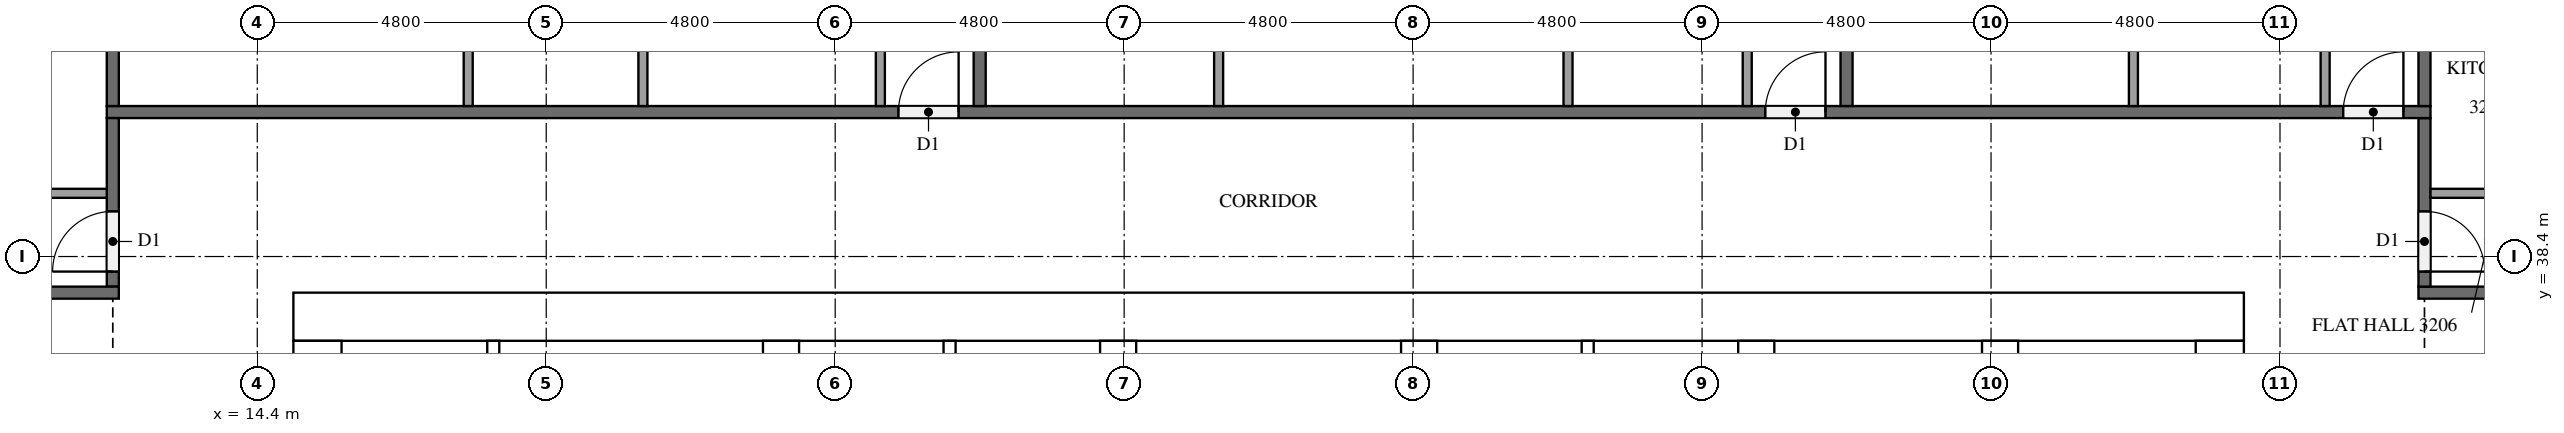
"""IFC4 building model, lengths in metres.
Left out: names, types, materials, properties, quantities, classifications, styles, units other than length and angle.
Written with IfcOpenShell. Run it as: python <this file> out.ifc"""

import sys

from ifc_helpers import new_model, si_unit, direction, frame, frame_2d, origin, place, context, subcontext, project, spatial, rectangle, extrude, element, fill, save


model = new_model("IFC4")
c1 = context("Model", 3, precision=1e-05, world=origin(), true_north=direction((0.0, 1.0)))
c2 = subcontext(c1, "Body", "Model", "MODEL_VIEW")
j1 = project(units=[si_unit("LENGTHUNIT", "METRE"), si_unit("PLANEANGLEUNIT", "RADIAN")], contexts=[c1])
p1 = place(None, origin())
s1 = spatial("IfcSite", under=j1, at=p1, CompositionType="ELEMENT")
p2 = place(p1, origin())
s2 = spatial("IfcBuilding", under=s1, at=p2, CompositionType="ELEMENT")
p3 = place(p2, frame((0.0, 0.0, 126.1)))
s3 = spatial("IfcBuildingStorey", under=s2, at=p3, CompositionType="ELEMENT", Elevation=126.1)
p4 = place(p3, frame((15.0, 37.4, 0.0), z_axis=(0.0, 0.0, 1.0), x_axis=(1.0, 0.0, 0.0)))
e1 = element("IfcWall", 1, at=p4, inside=s3, PredefinedType="SHEAR", context=c2, shape_type="SweptSolid", body=[
    extrude(rectangle(XDim=32.4, YDim=0.8, at=frame_2d((16.2, 0.0))), origin(), (0.0, 0.0, 1.0), 3.2),
])
p5 = place(p4, frame((15.3, 0.0, 0.0)))
e2 = element("IfcOpeningElement", 2, at=p5, cuts=e1, PredefinedType="OPENING", context=c2, shape_type="SweptSolid", body=[
    extrude(rectangle(XDim=1.8, YDim=2.1, at=frame_2d((0.9, 1.05))), frame((0.0, 0.41, 0.0), z_axis=(0.0, -1.0, 0.0), x_axis=(1.0, 0.0, 0.0)), (0.0, 0.0, 1.0), 0.82),
])
p6 = place(p4, frame((1.51, 0.0, 0.0)))
e3 = element("IfcOpeningElement", 3, at=p6, cuts=e1, PredefinedType="OPENING", context=c2, shape_type="SweptSolid", body=[
    extrude(rectangle(XDim=1.0, YDim=2.1, at=frame_2d((0.5, 1.05))), frame((0.0, 0.41, 0.0), z_axis=(0.0, -1.0, 0.0), x_axis=(1.0, 0.0, 0.0)), (0.0, 0.0, 1.0), 0.82),
])
p7 = place(p4, frame((5.11, 0.0, 0.0)))
e4 = element("IfcOpeningElement", 4, at=p7, cuts=e1, PredefinedType="OPENING", context=c2, shape_type="SweptSolid", body=[
    extrude(rectangle(XDim=1.0, YDim=2.1, at=frame_2d((0.5, 1.05))), frame((0.0, 0.41, 0.0), z_axis=(0.0, -1.0, 0.0), x_axis=(1.0, 0.0, 0.0)), (0.0, 0.0, 1.0), 0.82),
])
p8 = place(p3, frame((15.4, 15.8, 0.0), z_axis=(0.0, 0.0, 1.0), x_axis=(0.0, 1.0, 0.0)))
e5 = element("IfcWall", 5, at=p8, inside=s3, PredefinedType="SHEAR", context=c2, shape_type="SweptSolid", body=[
    extrude(rectangle(XDim=21.2, YDim=0.8, at=frame_2d((10.6, 0.0))), origin(), (0.0, 0.0, 1.0), 3.2),
])
p9 = place(p8, frame((4.96, 0.0, 0.0)))
e6 = element("IfcOpeningElement", 6, at=p9, cuts=e5, PredefinedType="OPENING", context=c2, shape_type="SweptSolid", body=[
    extrude(rectangle(XDim=1.2, YDim=2.1, at=frame_2d((0.6, 1.05))), frame((0.0, 0.41, 0.0), z_axis=(0.0, -1.0, 0.0), x_axis=(1.0, 0.0, 0.0)), (0.0, 0.0, 1.0), 0.82),
])
p10 = place(p3, frame((47.0, 15.8, 0.0), z_axis=(0.0, 0.0, 1.0), x_axis=(0.0, 1.0, 0.0)))
e7 = element("IfcWall", 7, at=p10, inside=s3, PredefinedType="SHEAR", context=c2, shape_type="SweptSolid", body=[
    extrude(rectangle(XDim=21.2, YDim=0.8, at=frame_2d((10.6, 0.0))), origin(), (0.0, 0.0, 1.0), 3.2),
])
p11 = place(p10, frame((10.3, 0.0, 0.0)))
e8 = element("IfcOpeningElement", 8, at=p11, cuts=e7, PredefinedType="OPENING", context=c2, shape_type="SweptSolid", body=[
    extrude(rectangle(XDim=1.2, YDim=2.1, at=frame_2d((0.6, 1.05))), frame((0.0, 0.41, 0.0), z_axis=(0.0, -1.0, 0.0), x_axis=(1.0, 0.0, 0.0)), (0.0, 0.0, 1.0), 0.82),
])
p12 = place(p3, frame((23.1, 15.8, 0.0), z_axis=(0.0, 0.0, 1.0), x_axis=(0.0, 1.0, 0.0)))
e9 = element("IfcWall", 9, at=p12, inside=s3, PredefinedType="SHEAR", context=c2, shape_type="SweptSolid", body=[
    extrude(rectangle(XDim=21.2, YDim=0.6, at=frame_2d((10.6, 0.0))), origin(), (0.0, 0.0, 1.0), 3.2),
])
p13 = place(p3, frame((39.3, 27.75, 0.0), z_axis=(0.0, 0.0, 1.0), x_axis=(0.0, 1.0, 0.0)))
e10 = element("IfcWall", 10, at=p13, inside=s3, PredefinedType="SHEAR", context=c2, shape_type="SweptSolid", body=[
    extrude(rectangle(XDim=9.25, YDim=0.6, at=frame_2d((4.625, 0.0))), origin(), (0.0, 0.0, 1.0), 3.2),
])
p14 = place(p3, frame((43.35, 27.75, 0.0), z_axis=(0.0, 0.0, 1.0), x_axis=(0.0, 1.0, 0.0)))
e11 = element("IfcWall", 11, at=p14, inside=s3, PredefinedType="SHEAR", context=c2, shape_type="SweptSolid", body=[
    extrude(rectangle(XDim=9.25, YDim=0.6, at=frame_2d((4.625, 0.0))), origin(), (0.0, 0.0, 1.0), 3.2),
])
p15 = place(p14, frame((7.65, 0.0, 0.0)))
e12 = element("IfcOpeningElement", 12, at=p15, cuts=e11, PredefinedType="OPENING", context=c2, shape_type="SweptSolid", body=[
    extrude(rectangle(XDim=1.2, YDim=2.1, at=frame_2d((0.6, 1.05))), frame((0.0, 0.31, 0.0), z_axis=(0.0, -1.0, 0.0), x_axis=(1.0, 0.0, 0.0)), (0.0, 0.0, 1.0), 0.62),
])
for number, where, z_axis, x_axis in (
    (13, (28.7, 33.85, 0.0), (0.0, 0.0, 1.0), (0.0, 1.0, 0.0)),
    (14, (33.7, 33.85, 0.0), (0.0, 0.0, 1.0), (0.0, 1.0, 0.0)),
):
    element("IfcWall", number, at=place(p3, frame(where, z_axis=z_axis, x_axis=x_axis)), inside=s3, PredefinedType="SHEAR", context=c2, shape_type="SweptSolid", body=[
        extrude(rectangle(XDim=3.15, YDim=0.6, at=frame_2d((1.575, 0.0))), origin(), (0.0, 0.0, 1.0), 3.2),
    ])
for number, where, z_axis, x_axis in (
    (15, (25.9, 33.85, 0.0), (0.0, 0.0, 1.0), (0.0, 1.0, 0.0)),
    (16, (36.5, 33.85, 0.0), (0.0, 0.0, 1.0), (0.0, 1.0, 0.0)),
):
    element("IfcWall", number, at=place(p3, frame(where, z_axis=z_axis, x_axis=x_axis)), inside=s3, PredefinedType="SOLIDWALL", context=c2, shape_type="SweptSolid", body=[
        extrude(rectangle(XDim=3.15, YDim=0.2, at=frame_2d((1.575, 0.0))), origin(), (0.0, 0.0, 1.0), 3.2),
    ])
p16 = place(p3, frame((18.32, 31.55, 0.0), z_axis=(0.0, 0.0, 1.0), x_axis=(0.0, 1.0, 0.0)))
e17 = element("IfcWall", 17, at=p16, inside=s3, PredefinedType="PARTITIONING", context=c2, shape_type="SweptSolid", body=[
    extrude(rectangle(XDim=5.45, YDim=0.2, at=frame_2d((2.725, 0.0))), origin(), (0.0, 0.0, 1.0), 3.2),
])
p17 = place(p3, frame((52.5, 37.8, 0.0), z_axis=(0.0, 0.0, 1.0), x_axis=(-1.0, 0.0, 0.0)))
e18 = element("IfcWall", 18, at=p17, inside=s3, PredefinedType="PARTITIONING", context=c2, shape_type="SweptSolid", body=[
    extrude(rectangle(XDim=2.2, YDim=0.2, at=frame_2d((1.1, 0.0))), origin(), (0.0, 0.0, 1.0), 3.2),
])
p18 = place(p3, frame((50.4, 40.7, 0.0), z_axis=(0.0, 0.0, 1.0), x_axis=(0.0, -1.0, 0.0)))
e19 = element("IfcWall", 19, at=p18, inside=s3, PredefinedType="PARTITIONING", context=c2, shape_type="SweptSolid", body=[
    extrude(rectangle(XDim=2.8, YDim=0.2, at=frame_2d((1.4, 0.0))), origin(), (0.0, 0.0, 1.0), 3.2),
])
p19 = place(p18, frame((1.55, 0.0, 0.0)))
e20 = element("IfcOpeningElement", 20, at=p19, cuts=e19, PredefinedType="OPENING", context=c2, shape_type="SweptSolid", body=[
    extrude(rectangle(XDim=1.0, YDim=2.1, at=frame_2d((0.5, 1.05))), frame((0.0, 0.11, 0.0), z_axis=(0.0, -1.0, 0.0), x_axis=(1.0, 0.0, 0.0)), (0.0, 0.0, 1.0), 0.22),
])
p20 = place(p3, frame((11.9, 40.8, 0.0), z_axis=(0.0, 0.0, 1.0), x_axis=(1.0, 0.0, 0.0)))
e21 = element("IfcWall", 21, at=p20, inside=s3, PredefinedType="PARTITIONING", context=c2, shape_type="SweptSolid", body=[
    extrude(rectangle(XDim=38.6, YDim=0.2, at=frame_2d((19.3, 0.0))), origin(), (0.0, 0.0, 1.0), 3.2),
])
p21 = place(p20, frame((37.15, 0.0, 0.0)))
e22 = element("IfcOpeningElement", 22, at=p21, cuts=e21, PredefinedType="OPENING", context=c2, shape_type="SweptSolid", body=[
    extrude(rectangle(XDim=1.0, YDim=2.1, at=frame_2d((0.5, 1.05))), frame((0.0, 0.11, 0.0), z_axis=(0.0, -1.0, 0.0), x_axis=(1.0, 0.0, 0.0)), (0.0, 0.0, 1.0), 0.22),
])
p22 = place(p20, frame((27.55, 0.0, 0.0)))
e23 = element("IfcOpeningElement", 23, at=p22, cuts=e21, PredefinedType="OPENING", context=c2, shape_type="SweptSolid", body=[
    extrude(rectangle(XDim=1.0, YDim=2.1, at=frame_2d((0.5, 1.05))), frame((0.0, 0.11, 0.0), z_axis=(0.0, -1.0, 0.0), x_axis=(1.0, 0.0, 0.0)), (0.0, 0.0, 1.0), 0.22),
])
p23 = place(p20, frame((13.15, 0.0, 0.0)))
e24 = element("IfcOpeningElement", 24, at=p23, cuts=e21, PredefinedType="OPENING", context=c2, shape_type="SweptSolid", body=[
    extrude(rectangle(XDim=1.0, YDim=2.1, at=frame_2d((0.5, 1.05))), frame((0.0, 0.11, 0.0), z_axis=(0.0, -1.0, 0.0), x_axis=(1.0, 0.0, 0.0)), (0.0, 0.0, 1.0), 0.22),
])
p24 = place(p3, frame((12.0, 37.9, 0.0), z_axis=(0.0, 0.0, 1.0), x_axis=(0.0, 1.0, 0.0)))
e25 = element("IfcWall", 25, at=p24, inside=s3, PredefinedType="PARTITIONING", context=c2, shape_type="SweptSolid", body=[
    extrude(rectangle(XDim=2.8, YDim=0.2, at=frame_2d((1.4, 0.0))), origin(), (0.0, 0.0, 1.0), 3.2),
])
p25 = place(p24, frame((0.25, 0.0, 0.0)))
e26 = element("IfcOpeningElement", 26, at=p25, cuts=e25, PredefinedType="OPENING", context=c2, shape_type="SweptSolid", body=[
    extrude(rectangle(XDim=1.0, YDim=2.1, at=frame_2d((0.5, 1.05))), frame((0.0, 0.11, 0.0), z_axis=(0.0, -1.0, 0.0), x_axis=(1.0, 0.0, 0.0)), (0.0, 0.0, 1.0), 0.22),
])
p26 = place(p3, frame((12.1, 37.8, 0.0), z_axis=(0.0, 0.0, 1.0), x_axis=(-1.0, 0.0, 0.0)))
e27 = element("IfcWall", 27, at=p26, inside=s3, PredefinedType="PARTITIONING", context=c2, shape_type="SweptSolid", body=[
    extrude(rectangle(XDim=2.2, YDim=0.2, at=frame_2d((1.1, 0.0))), origin(), (0.0, 0.0, 1.0), 3.2),
])
for number, where, z_axis, x_axis in (
    (28, (50.4, 40.9, 0.0), (0.0, 0.0, 1.0), (0.0, 1.0, 0.0)),
    (29, (40.8, 52.7, 0.0), (0.0, 0.0, 1.0), (0.0, -1.0, 0.0)),
    (30, (26.4, 52.7, 0.0), (0.0, 0.0, 1.0), (0.0, -1.0, 0.0)),
    (31, (12.0, 52.7, 0.0), (0.0, 0.0, 1.0), (0.0, -1.0, 0.0)),
):
    element("IfcWall", number, at=place(p3, frame(where, z_axis=z_axis, x_axis=x_axis)), inside=s3, PredefinedType="PARTITIONING", context=c2, shape_type="SweptSolid", body=[
        extrude(rectangle(XDim=11.8, YDim=0.2, at=frame_2d((5.9, 0.0))), origin(), (0.0, 0.0, 1.0), 3.2),
    ])
p27 = place(p3, frame((50.5, 39.45, 0.0), z_axis=(0.0, 0.0, 1.0), x_axis=(1.0, 0.0, 0.0)))
e32 = element("IfcWall", 32, at=p27, inside=s3, PredefinedType="PARTITIONING", context=c2, shape_type="SweptSolid", body=[
    extrude(rectangle(XDim=2.075, YDim=0.15, at=frame_2d((1.038, 0.0))), origin(), (0.0, 0.0, 1.0), 3.2),
])
p28 = place(p3, frame((45.565, 40.9, 0.0), z_axis=(0.0, 0.0, 1.0), x_axis=(0.0, 1.0, 0.0)))
e33 = element("IfcWall", 33, at=p28, inside=s3, PredefinedType="PARTITIONING", context=c2, shape_type="SweptSolid", body=[
    extrude(rectangle(XDim=3.725, YDim=0.15, at=frame_2d((1.863, 0.0))), origin(), (0.0, 0.0, 1.0), 3.2),
])
for number, where, z_axis, x_axis in (
    (34, (48.75, 40.9, 0.0), (0.0, 0.0, 1.0), (0.0, 1.0, 0.0)),
    (35, (36.173, 40.9, 0.0), (0.0, 0.0, 1.0), (0.0, 1.0, 0.0)),
    (36, (30.369, 40.9, 0.0), (0.0, 0.0, 1.0), (0.0, 1.0, 0.0)),
):
    element("IfcWall", number, at=place(p3, frame(where, z_axis=z_axis, x_axis=x_axis)), inside=s3, PredefinedType="PARTITIONING", context=c2, shape_type="SweptSolid", body=[
        extrude(rectangle(XDim=3.875, YDim=0.15, at=frame_2d((1.938, 0.0))), origin(), (0.0, 0.0, 1.0), 3.2),
    ])
p29 = place(p3, frame((39.15, 40.9, 0.0), z_axis=(0.0, 0.0, 1.0), x_axis=(0.0, 1.0, 0.0)))
e37 = element("IfcWall", 37, at=p29, inside=s3, PredefinedType="PARTITIONING", context=c2, shape_type="SweptSolid", body=[
    extrude(rectangle(XDim=4.025, YDim=0.15, at=frame_2d((2.013, 0.0))), origin(), (0.0, 0.0, 1.0), 3.2),
])
for number, where, z_axis, x_axis in (
    (38, (20.806, 40.9, 0.0), (0.0, 0.0, 1.0), (0.0, 1.0, 0.0)),
    (39, (17.904, 40.9, 0.0), (0.0, 0.0, 1.0), (0.0, 1.0, 0.0)),
):
    element("IfcWall", number, at=place(p3, frame(where, z_axis=z_axis, x_axis=x_axis)), inside=s3, PredefinedType="PARTITIONING", context=c2, shape_type="SweptSolid", body=[
        extrude(rectangle(XDim=4.475, YDim=0.15, at=frame_2d((2.238, 0.0))), origin(), (0.0, 0.0, 1.0), 3.2),
    ])
p30 = place(p3, frame((24.75, 40.9, 0.0), z_axis=(0.0, 0.0, 1.0), x_axis=(0.0, 1.0, 0.0)))
e40 = element("IfcWall", 40, at=p30, inside=s3, PredefinedType="PARTITIONING", context=c2, shape_type="SweptSolid", body=[
    extrude(rectangle(XDim=4.625, YDim=0.15, at=frame_2d((2.312, 0.0))), origin(), (0.0, 0.0, 1.0), 3.2),
])
p31 = place(p3, frame((11.9, 39.45, 0.0), z_axis=(0.0, 0.0, 1.0), x_axis=(-1.0, 0.0, 0.0)))
e41 = element("IfcWall", 41, at=p31, inside=s3, PredefinedType="PARTITIONING", context=c2, shape_type="SweptSolid", body=[
    extrude(rectangle(XDim=4.325, YDim=0.15, at=frame_2d((2.163, 0.0))), origin(), (0.0, 0.0, 1.0), 3.2),
])
p32 = place(p5, origin())
e42 = element("IfcDoor", 42, at=p32, inside=s3, OperationType="DOUBLE_DOOR_SINGLE_SWING", PredefinedType="DOOR", context=c2, shape_type="SweptSolid", body=[
    extrude(rectangle(XDim=1.8, YDim=2.1, at=frame_2d((0.9, 1.05))), frame((0.0, 0.025, 0.0), z_axis=(0.0, -1.0, 0.0), x_axis=(1.0, 0.0, 0.0)), (0.0, 0.0, 1.0), 0.05),
])
fill(e2, e42)
p33 = place(p6, origin())
e43 = element("IfcDoor", 43, at=p33, inside=s3, OperationType="SINGLE_SWING_LEFT", PredefinedType="DOOR", context=c2, shape_type="SweptSolid", body=[
    extrude(rectangle(XDim=1.0, YDim=2.1, at=frame_2d((0.5, 1.05))), frame((0.0, 0.025, 0.0), z_axis=(0.0, -1.0, 0.0), x_axis=(1.0, 0.0, 0.0)), (0.0, 0.0, 1.0), 0.05),
])
fill(e3, e43)
p34 = place(p7, origin())
e44 = element("IfcDoor", 44, at=p34, inside=s3, OperationType="SINGLE_SWING_RIGHT", PredefinedType="DOOR", context=c2, shape_type="SweptSolid", body=[
    extrude(rectangle(XDim=1.0, YDim=2.1, at=frame_2d((0.5, 1.05))), frame((0.0, 0.025, 0.0), z_axis=(0.0, -1.0, 0.0), x_axis=(1.0, 0.0, 0.0)), (0.0, 0.0, 1.0), 0.05),
])
fill(e4, e44)
p35 = place(p19, origin())
e45 = element("IfcDoor", 45, at=p35, inside=s3, OperationType="SINGLE_SWING_RIGHT", PredefinedType="DOOR", context=c2, shape_type="SweptSolid", body=[
    extrude(rectangle(XDim=1.0, YDim=2.1, at=frame_2d((0.5, 1.05))), frame((0.0, 0.025, 0.0), z_axis=(0.0, -1.0, 0.0), x_axis=(1.0, 0.0, 0.0)), (0.0, 0.0, 1.0), 0.05),
])
fill(e20, e45)
p36 = place(p21, origin())
e46 = element("IfcDoor", 46, at=p36, inside=s3, OperationType="SINGLE_SWING_RIGHT", PredefinedType="DOOR", context=c2, shape_type="SweptSolid", body=[
    extrude(rectangle(XDim=1.0, YDim=2.1, at=frame_2d((0.5, 1.05))), frame((0.0, 0.025, 0.0), z_axis=(0.0, -1.0, 0.0), x_axis=(1.0, 0.0, 0.0)), (0.0, 0.0, 1.0), 0.05),
])
fill(e22, e46)
p37 = place(p22, origin())
e47 = element("IfcDoor", 47, at=p37, inside=s3, OperationType="SINGLE_SWING_RIGHT", PredefinedType="DOOR", context=c2, shape_type="SweptSolid", body=[
    extrude(rectangle(XDim=1.0, YDim=2.1, at=frame_2d((0.5, 1.05))), frame((0.0, 0.025, 0.0), z_axis=(0.0, -1.0, 0.0), x_axis=(1.0, 0.0, 0.0)), (0.0, 0.0, 1.0), 0.05),
])
fill(e23, e47)
p38 = place(p23, origin())
e48 = element("IfcDoor", 48, at=p38, inside=s3, OperationType="SINGLE_SWING_RIGHT", PredefinedType="DOOR", context=c2, shape_type="SweptSolid", body=[
    extrude(rectangle(XDim=1.0, YDim=2.1, at=frame_2d((0.5, 1.05))), frame((0.0, 0.025, 0.0), z_axis=(0.0, -1.0, 0.0), x_axis=(1.0, 0.0, 0.0)), (0.0, 0.0, 1.0), 0.05),
])
fill(e24, e48)
p39 = place(p25, origin())
e49 = element("IfcDoor", 49, at=p39, inside=s3, OperationType="SINGLE_SWING_LEFT", PredefinedType="DOOR", context=c2, shape_type="SweptSolid", body=[
    extrude(rectangle(XDim=1.0, YDim=2.1, at=frame_2d((0.5, 1.05))), frame((0.0, 0.025, 0.0), z_axis=(0.0, -1.0, 0.0), x_axis=(1.0, 0.0, 0.0)), (0.0, 0.0, 1.0), 0.05),
])
fill(e26, e49)
save(model, sys.argv[1])
